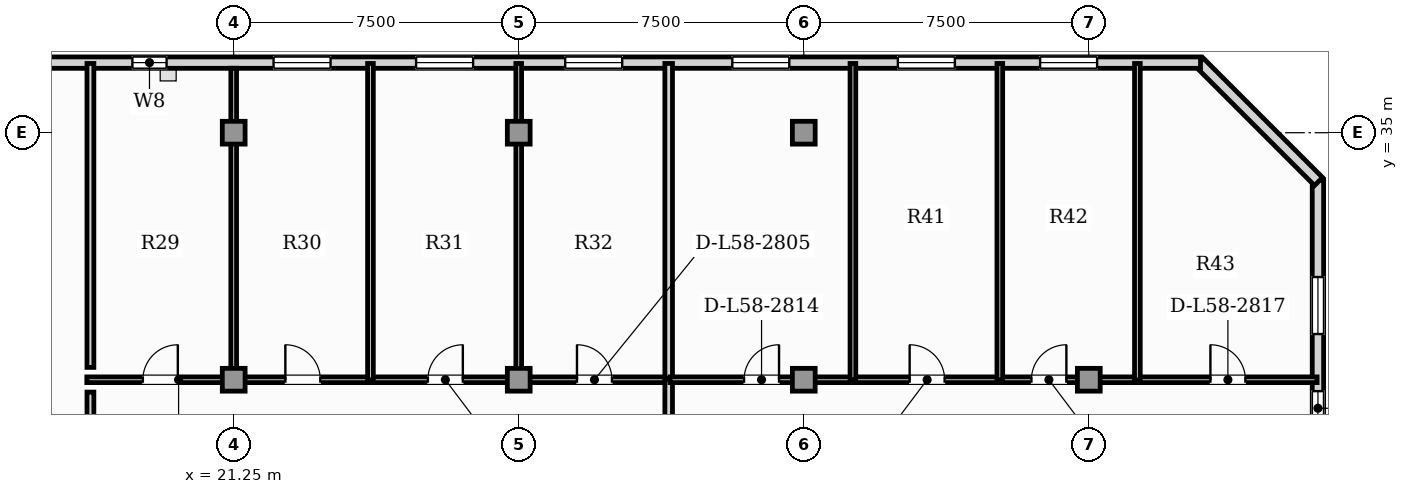
"""IFC4 building model, lengths in metres.
Left out: names, types, materials, properties, quantities, classifications, styles, units other than length and angle.
Written with IfcOpenShell. Run it as: python <this file> out.ifc"""

import sys

from ifc_helpers import new_model, si_unit, direction, frame, frame_2d, origin, origin_2d, place, context, subcontext, project, spatial, rectangle, extrude, element, fill, save


model = new_model("IFC4")
c1 = context("Model", 3, precision=1e-05, world=origin(), true_north=direction((0.0, 1.0)))
c2 = subcontext(c1, "Body", "Model", "MODEL_VIEW")
j1 = project(units=[si_unit("LENGTHUNIT", "METRE"), si_unit("PLANEANGLEUNIT", "RADIAN")], contexts=[c1])
p1 = place(None, origin())
s1 = spatial("IfcSite", under=j1, at=p1, CompositionType="ELEMENT")
p2 = place(p1, origin())
s2 = spatial("IfcBuilding", under=s1, at=p2, CompositionType="ELEMENT")
p3 = place(p2, frame((0.0, 0.0, 234.95)))
s3 = spatial("IfcBuildingStorey", under=s2, at=p3, CompositionType="ELEMENT", Elevation=234.95)
for number, where, z_axis, x_axis in (
    (1, (21.25, 28.5, 0.0), (0.0, 0.0, 1.0), (1.0, 0.0, 0.0)),
    (2, (28.75, 28.5, 0.0), (0.0, 0.0, 1.0), (1.0, 0.0, 0.0)),
    (3, (36.25, 28.5, 0.0), (0.0, 0.0, 1.0), (1.0, 0.0, 0.0)),
    (4, (43.75, 28.5, 0.0), (0.0, 0.0, 1.0), (1.0, 0.0, 0.0)),
    (5, (21.25, 35.0, 0.0), (0.0, 0.0, 1.0), (1.0, 0.0, 0.0)),
    (6, (28.75, 35.0, 0.0), (0.0, 0.0, 1.0), (1.0, 0.0, 0.0)),
    (7, (36.25, 35.0, 0.0), (0.0, 0.0, 1.0), (1.0, 0.0, 0.0)),
):
    element("IfcColumn", number, at=place(p3, frame(where, z_axis=z_axis, x_axis=x_axis)), inside=s3, PredefinedType="COLUMN", context=c2, shape_type="SweptSolid", body=[
        extrude(rectangle(XDim=0.6, YDim=0.6, at=origin_2d()), origin(), (0.0, 0.0, 1.0), 3.85),
    ])
p4 = place(p3, frame((49.779, 3.24, 0.0), z_axis=(0.0, 0.0, 1.0), x_axis=(0.0, 1.0, 0.0)))
e8 = element("IfcWall", 8, at=p4, inside=s3, PredefinedType="SOLIDWALL", context=c2, shape_type="SweptSolid", body=[
    extrude(rectangle(XDim=30.514, YDim=0.3, at=frame_2d((15.257, 0.0))), origin(), (0.0, 0.0, 1.0), 3.63),
])
p5 = place(p4, frame((24.06, 0.0, 0.95)))
e9 = element("IfcOpeningElement", 9, at=p5, cuts=e8, PredefinedType="OPENING", context=c2, shape_type="SweptSolid", body=[
    extrude(rectangle(XDim=0.9, YDim=1.5, at=frame_2d((0.45, 0.75))), frame((0.0, 0.16, 0.0), z_axis=(0.0, -1.0, 0.0), x_axis=(1.0, 0.0, 0.0)), (0.0, 0.0, 1.0), 0.32),
])
p6 = place(p4, frame((11.029, 0.0, 0.95)))
e10 = element("IfcOpeningElement", 10, at=p6, cuts=e8, PredefinedType="OPENING", context=c2, shape_type="SweptSolid", body=[
    extrude(rectangle(XDim=0.9, YDim=1.5, at=frame_2d((0.45, 0.75))), frame((0.0, 0.16, 0.0), z_axis=(0.0, -1.0, 0.0), x_axis=(1.0, 0.0, 0.0)), (0.0, 0.0, 1.0), 0.32),
])
p7 = place(p4, frame((13.372, 0.0, 0.9)))
e11 = element("IfcOpeningElement", 11, at=p7, cuts=e8, PredefinedType="OPENING", context=c2, shape_type="SweptSolid", body=[
    extrude(rectangle(XDim=1.5, YDim=1.95, at=frame_2d((0.75, 0.975))), frame((0.0, 0.16, 0.0), z_axis=(0.0, -1.0, 0.0), x_axis=(1.0, 0.0, 0.0)), (0.0, 0.0, 1.0), 0.32),
])
p8 = place(p4, frame((19.037, 0.0, 0.9)))
e12 = element("IfcOpeningElement", 12, at=p8, cuts=e8, PredefinedType="OPENING", context=c2, shape_type="SweptSolid", body=[
    extrude(rectangle(XDim=1.5, YDim=1.95, at=frame_2d((0.75, 0.975))), frame((0.0, 0.16, 0.0), z_axis=(0.0, -1.0, 0.0), x_axis=(1.0, 0.0, 0.0)), (0.0, 0.0, 1.0), 0.32),
])
p9 = place(p4, frame((26.463, 0.0, 0.9)))
e13 = element("IfcOpeningElement", 13, at=p9, cuts=e8, PredefinedType="OPENING", context=c2, shape_type="SweptSolid", body=[
    extrude(rectangle(XDim=1.5, YDim=1.95, at=frame_2d((0.75, 0.975))), frame((0.0, 0.16, 0.0), z_axis=(0.0, -1.0, 0.0), x_axis=(1.0, 0.0, 0.0)), (0.0, 0.0, 1.0), 0.32),
])
p10 = place(p3, frame((49.794, 33.717, 0.0), z_axis=(0.0, 0.0, 1.0), x_axis=(-0.707079321262, 0.707134240044, 0.0)))
e14 = element("IfcWall", 14, at=p10, inside=s3, PredefinedType="SOLIDWALL", context=c2, shape_type="SweptSolid", body=[
    extrude(rectangle(XDim=4.446, YDim=0.3, at=frame_2d((2.223, 0.0))), origin(), (0.0, 0.0, 1.0), 3.63),
])
p11 = place(p3, frame((46.689, 36.844, 0.0), z_axis=(0.0, 0.0, 1.0), x_axis=(-1.0, 0.0, 0.0)))
e15 = element("IfcWall", 15, at=p11, inside=s3, PredefinedType="SOLIDWALL", context=c2, shape_type="SweptSolid", body=[
    extrude(rectangle(XDim=35.878, YDim=0.3, at=frame_2d((17.939, 0.0))), origin(), (0.0, 0.0, 1.0), 3.63),
])
p12 = place(p11, frame((32.25, 0.0, 0.9)))
e16 = element("IfcOpeningElement", 16, at=p12, cuts=e15, PredefinedType="OPENING", context=c2, shape_type="SweptSolid", body=[
    extrude(rectangle(XDim=1.5, YDim=1.95, at=frame_2d((0.75, 0.975))), frame((0.0, 0.16, 0.0), z_axis=(0.0, -1.0, 0.0), x_axis=(1.0, 0.0, 0.0)), (0.0, 0.0, 1.0), 0.32),
])
p13 = place(p11, frame((27.205, 0.0, 0.9)))
e17 = element("IfcOpeningElement", 17, at=p13, cuts=e15, PredefinedType="OPENING", context=c2, shape_type="SweptSolid", body=[
    extrude(rectangle(XDim=0.9, YDim=1.4, at=frame_2d((0.45, 0.7))), frame((0.0, 0.16, 0.0), z_axis=(0.0, -1.0, 0.0), x_axis=(1.0, 0.0, 0.0)), (0.0, 0.0, 1.0), 0.32),
])
p14 = place(p11, frame((22.89, 0.0, 0.9)))
e18 = element("IfcOpeningElement", 18, at=p14, cuts=e15, PredefinedType="OPENING", context=c2, shape_type="SweptSolid", body=[
    extrude(rectangle(XDim=1.5, YDim=1.95, at=frame_2d((0.75, 0.975))), frame((0.0, 0.16, 0.0), z_axis=(0.0, -1.0, 0.0), x_axis=(1.0, 0.0, 0.0)), (0.0, 0.0, 1.0), 0.32),
])
p15 = place(p11, frame((19.14, 0.0, 0.9)))
e19 = element("IfcOpeningElement", 19, at=p15, cuts=e15, PredefinedType="OPENING", context=c2, shape_type="SweptSolid", body=[
    extrude(rectangle(XDim=1.5, YDim=1.95, at=frame_2d((0.75, 0.975))), frame((0.0, 0.16, 0.0), z_axis=(0.0, -1.0, 0.0), x_axis=(1.0, 0.0, 0.0)), (0.0, 0.0, 1.0), 0.32),
])
p16 = place(p11, frame((15.216, 0.0, 0.9)))
e20 = element("IfcOpeningElement", 20, at=p16, cuts=e15, PredefinedType="OPENING", context=c2, shape_type="SweptSolid", body=[
    extrude(rectangle(XDim=1.5, YDim=1.95, at=frame_2d((0.75, 0.975))), frame((0.0, 0.16, 0.0), z_axis=(0.0, -1.0, 0.0), x_axis=(1.0, 0.0, 0.0)), (0.0, 0.0, 1.0), 0.32),
])
p17 = place(p11, frame((10.82, 0.0, 0.9)))
e21 = element("IfcOpeningElement", 21, at=p17, cuts=e15, PredefinedType="OPENING", context=c2, shape_type="SweptSolid", body=[
    extrude(rectangle(XDim=1.5, YDim=1.95, at=frame_2d((0.75, 0.975))), frame((0.0, 0.16, 0.0), z_axis=(0.0, -1.0, 0.0), x_axis=(1.0, 0.0, 0.0)), (0.0, 0.0, 1.0), 0.32),
])
p18 = place(p11, frame((6.463, 0.0, 0.9)))
e22 = element("IfcOpeningElement", 22, at=p18, cuts=e15, PredefinedType="OPENING", context=c2, shape_type="SweptSolid", body=[
    extrude(rectangle(XDim=1.5, YDim=1.95, at=frame_2d((0.75, 0.975))), frame((0.0, 0.16, 0.0), z_axis=(0.0, -1.0, 0.0), x_axis=(1.0, 0.0, 0.0)), (0.0, 0.0, 1.0), 0.32),
])
p19 = place(p11, frame((2.721, 0.0, 0.9)))
e23 = element("IfcOpeningElement", 23, at=p19, cuts=e15, PredefinedType="OPENING", context=c2, shape_type="SweptSolid", body=[
    extrude(rectangle(XDim=1.5, YDim=1.95, at=frame_2d((0.75, 0.975))), frame((0.0, 0.16, 0.0), z_axis=(0.0, -1.0, 0.0), x_axis=(1.0, 0.0, 0.0)), (0.0, 0.0, 1.0), 0.32),
])
p20 = place(p3, frame((17.385, 28.5, 0.0), z_axis=(0.0, 0.0, 1.0), x_axis=(1.0, 0.0, 0.0)))
e24 = element("IfcWall", 24, at=p20, inside=s3, PredefinedType="PARTITIONING", context=c2, shape_type="SweptSolid", body=[
    extrude(rectangle(XDim=3.87, YDim=0.15, at=frame_2d((1.935, 0.0))), origin(), (0.0, 0.0, 1.0), 3.085),
])
p21 = place(p20, frame((1.475, 0.0, 0.0)))
e25 = element("IfcOpeningElement", 25, at=p21, cuts=e24, PredefinedType="OPENING", context=c2, shape_type="SweptSolid", body=[
    extrude(rectangle(XDim=0.92, YDim=2.1, at=frame_2d((0.46, 1.05))), frame((0.0, 0.085, 0.0), z_axis=(0.0, -1.0, 0.0), x_axis=(1.0, 0.0, 0.0)), (0.0, 0.0, 1.0), 0.17),
])
p22 = place(p3, frame((21.285, 28.5, 0.0), z_axis=(0.0, 0.0, 1.0), x_axis=(1.0, 0.0, 0.0)))
e26 = element("IfcWall", 26, at=p22, inside=s3, PredefinedType="PARTITIONING", context=c2, shape_type="SweptSolid", body=[
    extrude(rectangle(XDim=3.569, YDim=0.15, at=frame_2d((1.784, 0.0))), origin(), (0.0, 0.0, 1.0), 3.085),
])
p23 = place(p22, frame((1.324, 0.0, 0.0)))
e27 = element("IfcOpeningElement", 27, at=p23, cuts=e26, PredefinedType="OPENING", context=c2, shape_type="SweptSolid", body=[
    extrude(rectangle(XDim=0.92, YDim=2.1, at=frame_2d((0.46, 1.05))), frame((0.0, 0.085, 0.0), z_axis=(0.0, -1.0, 0.0), x_axis=(1.0, 0.0, 0.0)), (0.0, 0.0, 1.0), 0.17),
])
p24 = place(p3, frame((24.883, 28.5, 0.0), z_axis=(0.0, 0.0, 1.0), x_axis=(1.0, 0.0, 0.0)))
e28 = element("IfcWall", 28, at=p24, inside=s3, PredefinedType="PARTITIONING", context=c2, shape_type="SweptSolid", body=[
    extrude(rectangle(XDim=3.872, YDim=0.15, at=frame_2d((1.936, 0.0))), origin(), (0.0, 0.0, 1.0), 3.085),
])
p25 = place(p24, frame((1.476, 0.0, 0.0)))
e29 = element("IfcOpeningElement", 29, at=p25, cuts=e28, PredefinedType="OPENING", context=c2, shape_type="SweptSolid", body=[
    extrude(rectangle(XDim=0.92, YDim=2.1, at=frame_2d((0.46, 1.05))), frame((0.0, 0.085, 0.0), z_axis=(0.0, -1.0, 0.0), x_axis=(1.0, 0.0, 0.0)), (0.0, 0.0, 1.0), 0.17),
])
p26 = place(p3, frame((28.785, 28.5, 0.0), z_axis=(0.0, 0.0, 1.0), x_axis=(1.0, 0.0, 0.0)))
e30 = element("IfcWall", 30, at=p26, inside=s3, PredefinedType="PARTITIONING", context=c2, shape_type="SweptSolid", body=[
    extrude(rectangle(XDim=3.915, YDim=0.15, at=frame_2d((1.958, 0.0))), origin(), (0.0, 0.0, 1.0), 3.085),
])
p27 = place(p26, frame((1.498, 0.0, 0.0)))
e31 = element("IfcOpeningElement", 31, at=p27, cuts=e30, PredefinedType="OPENING", context=c2, shape_type="SweptSolid", body=[
    extrude(rectangle(XDim=0.92, YDim=2.1, at=frame_2d((0.46, 1.05))), frame((0.0, 0.085, 0.0), z_axis=(0.0, -1.0, 0.0), x_axis=(1.0, 0.0, 0.0)), (0.0, 0.0, 1.0), 0.17),
])
p28 = place(p3, frame((32.695, 26.995, 0.0), z_axis=(0.0, 0.0, 1.0), x_axis=(0.0, 1.0, 0.0)))
e32 = element("IfcWall", 32, at=p28, inside=s3, PredefinedType="PARTITIONING", context=c2, shape_type="SweptSolid", body=[
    extrude(rectangle(XDim=1.51, YDim=0.2, at=frame_2d((0.755, 0.0))), origin(), (0.0, 0.0, 1.0), 3.63),
])
p29 = place(p3, frame((21.25, 28.495, 0.0), z_axis=(0.0, 0.0, 1.0), x_axis=(0.0, 1.0, 0.0)))
e33 = element("IfcWall", 33, at=p29, inside=s3, PredefinedType="PARTITIONING", context=c2, shape_type="SweptSolid", body=[
    extrude(rectangle(XDim=8.201, YDim=0.15, at=frame_2d((4.101, 0.0))), origin(), (0.0, 0.0, 1.0), 3.63),
])
for number, where, z_axis, x_axis in (
    (34, (24.848, 28.495, 0.0), (0.0, 0.0, 1.0), (0.0, 1.0, 0.0)),
    (35, (28.75, 28.495, 0.0), (0.0, 0.0, 1.0), (0.0, 1.0, 0.0)),
):
    element("IfcWall", number, at=place(p3, frame(where, z_axis=z_axis, x_axis=x_axis)), inside=s3, PredefinedType="PARTITIONING", context=c2, shape_type="SweptSolid", body=[
        extrude(rectangle(XDim=8.327, YDim=0.15, at=frame_2d((4.164, 0.0))), origin(), (0.0, 0.0, 1.0), 3.63),
    ])
p30 = place(p3, frame((32.695, 28.535, 0.0), z_axis=(0.0, 0.0, 1.0), x_axis=(0.0, 1.0, 0.0)))
e36 = element("IfcWall", 36, at=p30, inside=s3, PredefinedType="PARTITIONING", context=c2, shape_type="SweptSolid", body=[
    extrude(rectangle(XDim=8.287, YDim=0.2, at=frame_2d((4.144, 0.0))), origin(), (0.0, 0.0, 1.0), 3.63),
])
p31 = place(p3, frame((32.73, 28.5, 0.0), z_axis=(0.0, 0.0, 1.0), x_axis=(1.0, 0.0, 0.0)))
e37 = element("IfcWall", 37, at=p31, inside=s3, PredefinedType="PARTITIONING", context=c2, shape_type="SweptSolid", body=[
    extrude(rectangle(XDim=4.818, YDim=0.15, at=frame_2d((2.409, 0.0))), origin(), (0.0, 0.0, 1.0), 3.085),
])
p32 = place(p31, frame((1.949, 0.0, 0.0)))
e38 = element("IfcOpeningElement", 38, at=p32, cuts=e37, PredefinedType="OPENING", context=c2, shape_type="SweptSolid", body=[
    extrude(rectangle(XDim=0.92, YDim=2.1, at=frame_2d((0.46, 1.05))), frame((0.0, 0.085, 0.0), z_axis=(0.0, -1.0, 0.0), x_axis=(1.0, 0.0, 0.0)), (0.0, 0.0, 1.0), 0.17),
])
p33 = place(p3, frame((37.578, 28.5, 0.0), z_axis=(0.0, 0.0, 1.0), x_axis=(1.0, 0.0, 0.0)))
e39 = element("IfcWall", 39, at=p33, inside=s3, PredefinedType="PARTITIONING", context=c2, shape_type="SweptSolid", body=[
    extrude(rectangle(XDim=3.835, YDim=0.15, at=frame_2d((1.917, 0.0))), origin(), (0.0, 0.0, 1.0), 3.085),
])
p34 = place(p33, frame((1.458, 0.0, 0.0)))
e40 = element("IfcOpeningElement", 40, at=p34, cuts=e39, PredefinedType="OPENING", context=c2, shape_type="SweptSolid", body=[
    extrude(rectangle(XDim=0.92, YDim=2.1, at=frame_2d((0.46, 1.05))), frame((0.0, 0.085, 0.0), z_axis=(0.0, -1.0, 0.0), x_axis=(1.0, 0.0, 0.0)), (0.0, 0.0, 1.0), 0.17),
])
p35 = place(p3, frame((41.443, 28.5, 0.0), z_axis=(0.0, 0.0, 1.0), x_axis=(1.0, 0.0, 0.0)))
e41 = element("IfcWall", 41, at=p35, inside=s3, PredefinedType="PARTITIONING", context=c2, shape_type="SweptSolid", body=[
    extrude(rectangle(XDim=3.59, YDim=0.15, at=frame_2d((1.795, 0.0))), origin(), (0.0, 0.0, 1.0), 3.085),
])
p36 = place(p35, frame((0.796, 0.0, 0.0)))
e42 = element("IfcOpeningElement", 42, at=p36, cuts=e41, PredefinedType="OPENING", context=c2, shape_type="SweptSolid", body=[
    extrude(rectangle(XDim=0.92, YDim=2.1, at=frame_2d((0.46, 1.05))), frame((0.0, 0.085, 0.0), z_axis=(0.0, -1.0, 0.0), x_axis=(1.0, 0.0, 0.0)), (0.0, 0.0, 1.0), 0.17),
])
p37 = place(p3, frame((45.063, 28.5, 0.0), z_axis=(0.0, 0.0, 1.0), x_axis=(1.0, 0.0, 0.0)))
e43 = element("IfcWall", 43, at=p37, inside=s3, PredefinedType="PARTITIONING", context=c2, shape_type="SweptSolid", body=[
    extrude(rectangle(XDim=4.693, YDim=0.15, at=frame_2d((2.347, 0.0))), origin(), (0.0, 0.0, 1.0), 3.63),
])
p38 = place(p37, frame((1.887, 0.0, 0.0)))
e44 = element("IfcOpeningElement", 44, at=p38, cuts=e43, PredefinedType="OPENING", context=c2, shape_type="SweptSolid", body=[
    extrude(rectangle(XDim=0.92, YDim=2.1, at=frame_2d((0.46, 1.05))), frame((0.0, 0.085, 0.0), z_axis=(0.0, -1.0, 0.0), x_axis=(1.0, 0.0, 0.0)), (0.0, 0.0, 1.0), 0.17),
])
for number, where, z_axis, x_axis in (
    (45, (37.543, 28.495, 0.0), (0.0, 0.0, 1.0), (0.0, 1.0, 0.0)),
    (46, (41.408, 28.495, 0.0), (0.0, 0.0, 1.0), (0.0, 1.0, 0.0)),
    (47, (45.028, 28.495, 0.0), (0.0, 0.0, 1.0), (0.0, 1.0, 0.0)),
):
    element("IfcWall", number, at=place(p3, frame(where, z_axis=z_axis, x_axis=x_axis)), inside=s3, PredefinedType="PARTITIONING", context=c2, shape_type="SweptSolid", body=[
        extrude(rectangle(XDim=8.327, YDim=0.15, at=frame_2d((4.164, 0.0))), origin(), (0.0, 0.0, 1.0), 3.63),
    ])
p39 = place(p3, frame((17.48, 27.325, 0.0), z_axis=(0.0, 0.0, 1.0), x_axis=(0.0, 1.0, 0.0)))
e48 = element("IfcWall", 48, at=p39, inside=s3, PredefinedType="PARTITIONING", context=c2, shape_type="SweptSolid", body=[
    extrude(rectangle(XDim=0.85, YDim=0.18, at=frame_2d((0.425, 0.0))), origin(), (0.0, 0.0, 1.0), 3.63),
])
p40 = place(p3, frame((17.48, 28.825, 0.0), z_axis=(0.0, 0.0, 1.0), x_axis=(0.0, 1.0, 0.0)))
e49 = element("IfcWall", 49, at=p40, inside=s3, PredefinedType="PARTITIONING", context=c2, shape_type="SweptSolid", body=[
    extrude(rectangle(XDim=7.997, YDim=0.18, at=frame_2d((3.999, 0.0))), origin(), (0.0, 0.0, 1.0), 3.63),
])
p41 = place(p13, origin())
e50 = element("IfcWindow", 50, at=p41, inside=s3, PartitioningType="SINGLE_PANEL", PredefinedType="WINDOW", context=c2, shape_type="SweptSolid", body=[
    extrude(rectangle(XDim=0.9, YDim=1.4, at=frame_2d((0.45, 0.7))), frame((0.0, 0.03, 0.0), z_axis=(0.0, -1.0, 0.0), x_axis=(1.0, 0.0, 0.0)), (0.0, 0.0, 1.0), 0.06),
])
fill(e17, e50)
p42 = place(p14, origin())
e51 = element("IfcWindow", 51, at=p42, inside=s3, PartitioningType="SINGLE_PANEL", PredefinedType="WINDOW", context=c2, shape_type="SweptSolid", body=[
    extrude(rectangle(XDim=1.5, YDim=1.95, at=frame_2d((0.75, 0.975))), frame((0.0, 0.03, 0.0), z_axis=(0.0, -1.0, 0.0), x_axis=(1.0, 0.0, 0.0)), (0.0, 0.0, 1.0), 0.06),
])
fill(e18, e51)
p43 = place(p15, origin())
e52 = element("IfcWindow", 52, at=p43, inside=s3, PartitioningType="SINGLE_PANEL", PredefinedType="WINDOW", context=c2, shape_type="SweptSolid", body=[
    extrude(rectangle(XDim=1.5, YDim=1.95, at=frame_2d((0.75, 0.975))), frame((0.0, 0.03, 0.0), z_axis=(0.0, -1.0, 0.0), x_axis=(1.0, 0.0, 0.0)), (0.0, 0.0, 1.0), 0.06),
])
fill(e19, e52)
p44 = place(p16, origin())
e53 = element("IfcWindow", 53, at=p44, inside=s3, PartitioningType="SINGLE_PANEL", PredefinedType="WINDOW", context=c2, shape_type="SweptSolid", body=[
    extrude(rectangle(XDim=1.5, YDim=1.95, at=frame_2d((0.75, 0.975))), frame((0.0, 0.03, 0.0), z_axis=(0.0, -1.0, 0.0), x_axis=(1.0, 0.0, 0.0)), (0.0, 0.0, 1.0), 0.06),
])
fill(e20, e53)
p45 = place(p5, origin())
e54 = element("IfcWindow", 54, at=p45, inside=s3, PartitioningType="SINGLE_PANEL", PredefinedType="WINDOW", context=c2, shape_type="SweptSolid", body=[
    extrude(rectangle(XDim=0.9, YDim=1.5, at=frame_2d((0.45, 0.75))), frame((0.0, 0.03, 0.0), z_axis=(0.0, -1.0, 0.0), x_axis=(1.0, 0.0, 0.0)), (0.0, 0.0, 1.0), 0.06),
])
fill(e9, e54)
p46 = place(p17, origin())
e55 = element("IfcWindow", 55, at=p46, inside=s3, PartitioningType="SINGLE_PANEL", PredefinedType="WINDOW", context=c2, shape_type="SweptSolid", body=[
    extrude(rectangle(XDim=1.5, YDim=1.95, at=frame_2d((0.75, 0.975))), frame((0.0, 0.03, 0.0), z_axis=(0.0, -1.0, 0.0), x_axis=(1.0, 0.0, 0.0)), (0.0, 0.0, 1.0), 0.06),
])
fill(e21, e55)
p47 = place(p18, origin())
e56 = element("IfcWindow", 56, at=p47, inside=s3, PartitioningType="SINGLE_PANEL", PredefinedType="WINDOW", context=c2, shape_type="SweptSolid", body=[
    extrude(rectangle(XDim=1.5, YDim=1.95, at=frame_2d((0.75, 0.975))), frame((0.0, 0.03, 0.0), z_axis=(0.0, -1.0, 0.0), x_axis=(1.0, 0.0, 0.0)), (0.0, 0.0, 1.0), 0.06),
])
fill(e22, e56)
p48 = place(p19, origin())
e57 = element("IfcWindow", 57, at=p48, inside=s3, PartitioningType="SINGLE_PANEL", PredefinedType="WINDOW", context=c2, shape_type="SweptSolid", body=[
    extrude(rectangle(XDim=1.5, YDim=1.95, at=frame_2d((0.75, 0.975))), frame((0.0, 0.03, 0.0), z_axis=(0.0, -1.0, 0.0), x_axis=(1.0, 0.0, 0.0)), (0.0, 0.0, 1.0), 0.06),
])
fill(e23, e57)
p49 = place(p9, origin())
e58 = element("IfcWindow", 58, at=p49, inside=s3, PartitioningType="SINGLE_PANEL", PredefinedType="WINDOW", context=c2, shape_type="SweptSolid", body=[
    extrude(rectangle(XDim=1.5, YDim=1.95, at=frame_2d((0.75, 0.975))), frame((0.0, 0.03, 0.0), z_axis=(0.0, -1.0, 0.0), x_axis=(1.0, 0.0, 0.0)), (0.0, 0.0, 1.0), 0.06),
])
fill(e13, e58)
p50 = place(p21, origin())
e59 = element("IfcDoor", 59, at=p50, inside=s3, OperationType="SINGLE_SWING_RIGHT", PredefinedType="DOOR", context=c2, shape_type="SweptSolid", body=[
    extrude(rectangle(XDim=0.92, YDim=2.1, at=frame_2d((0.46, 1.05))), frame((0.0, 0.025, 0.0), z_axis=(0.0, -1.0, 0.0), x_axis=(1.0, 0.0, 0.0)), (0.0, 0.0, 1.0), 0.05),
])
fill(e25, e59)
p51 = place(p23, origin())
e60 = element("IfcDoor", 60, at=p51, inside=s3, OperationType="SINGLE_SWING_LEFT", PredefinedType="DOOR", context=c2, shape_type="SweptSolid", body=[
    extrude(rectangle(XDim=0.92, YDim=2.1, at=frame_2d((0.46, 1.05))), frame((0.0, 0.025, 0.0), z_axis=(0.0, -1.0, 0.0), x_axis=(1.0, 0.0, 0.0)), (0.0, 0.0, 1.0), 0.05),
])
fill(e27, e60)
p52 = place(p25, origin())
e61 = element("IfcDoor", 61, at=p52, inside=s3, OperationType="SINGLE_SWING_RIGHT", PredefinedType="DOOR", context=c2, shape_type="SweptSolid", body=[
    extrude(rectangle(XDim=0.92, YDim=2.1, at=frame_2d((0.46, 1.05))), frame((0.0, 0.025, 0.0), z_axis=(0.0, -1.0, 0.0), x_axis=(1.0, 0.0, 0.0)), (0.0, 0.0, 1.0), 0.05),
])
fill(e29, e61)
p53 = place(p27, origin())
e62 = element("IfcDoor", 62, at=p53, inside=s3, OperationType="SINGLE_SWING_LEFT", PredefinedType="DOOR", context=c2, shape_type="SweptSolid", body=[
    extrude(rectangle(XDim=0.92, YDim=2.1, at=frame_2d((0.46, 1.05))), frame((0.0, 0.025, 0.0), z_axis=(0.0, -1.0, 0.0), x_axis=(1.0, 0.0, 0.0)), (0.0, 0.0, 1.0), 0.05),
])
fill(e31, e62)
p54 = place(p32, origin())
e63 = element("IfcDoor", 63, at=p54, inside=s3, OperationType="SINGLE_SWING_RIGHT", PredefinedType="DOOR", context=c2, shape_type="SweptSolid", body=[
    extrude(rectangle(XDim=0.92, YDim=2.1, at=frame_2d((0.46, 1.05))), frame((0.0, 0.025, 0.0), z_axis=(0.0, -1.0, 0.0), x_axis=(1.0, 0.0, 0.0)), (0.0, 0.0, 1.0), 0.05),
])
fill(e38, e63)
p55 = place(p34, origin())
e64 = element("IfcDoor", 64, at=p55, inside=s3, OperationType="SINGLE_SWING_LEFT", PredefinedType="DOOR", context=c2, shape_type="SweptSolid", body=[
    extrude(rectangle(XDim=0.92, YDim=2.1, at=frame_2d((0.46, 1.05))), frame((0.0, 0.025, 0.0), z_axis=(0.0, -1.0, 0.0), x_axis=(1.0, 0.0, 0.0)), (0.0, 0.0, 1.0), 0.05),
])
fill(e40, e64)
p56 = place(p36, origin())
e65 = element("IfcDoor", 65, at=p56, inside=s3, OperationType="SINGLE_SWING_RIGHT", PredefinedType="DOOR", context=c2, shape_type="SweptSolid", body=[
    extrude(rectangle(XDim=0.92, YDim=2.1, at=frame_2d((0.46, 1.05))), frame((0.0, 0.025, 0.0), z_axis=(0.0, -1.0, 0.0), x_axis=(1.0, 0.0, 0.0)), (0.0, 0.0, 1.0), 0.05),
])
fill(e42, e65)
p57 = place(p38, origin())
e66 = element("IfcDoor", 66, at=p57, inside=s3, OperationType="SINGLE_SWING_LEFT", PredefinedType="DOOR", context=c2, shape_type="SweptSolid", body=[
    extrude(rectangle(XDim=0.92, YDim=2.1, at=frame_2d((0.46, 1.05))), frame((0.0, 0.025, 0.0), z_axis=(0.0, -1.0, 0.0), x_axis=(1.0, 0.0, 0.0)), (0.0, 0.0, 1.0), 0.05),
])
fill(e44, e66)
save(model, sys.argv[1])
